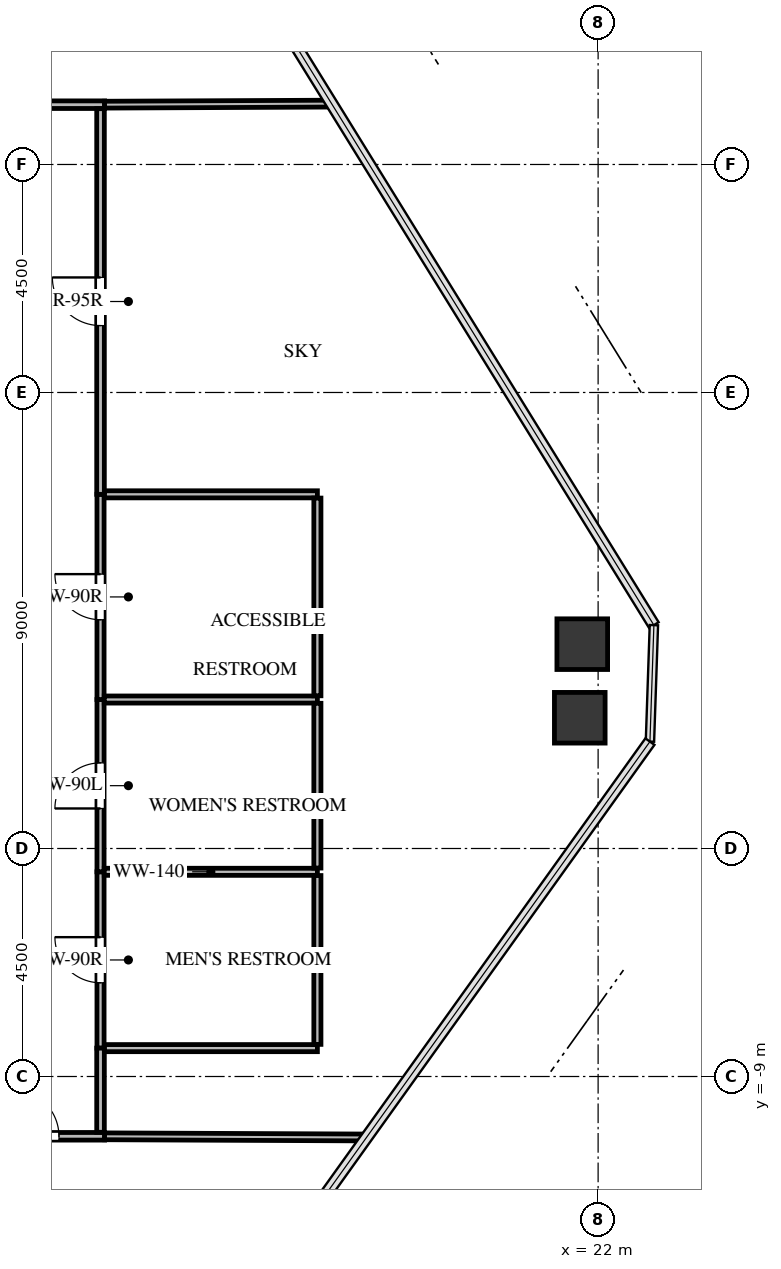
"""IFC4 building model, lengths in metres.
Left out: names, types, materials, properties, quantities, classifications, styles, units other than length and angle.
Written with IfcOpenShell. Run it as: python <this file> out.ifc"""

import sys

from ifc_helpers import new_model, si_unit, direction, frame, frame_2d, origin, origin_2d, place, context, subcontext, project, spatial, rectangle, extrude, source, transform, mapped, element, fill, save


model = new_model("IFC4")
c1 = context("Model", 3, precision=1e-05, world=origin(), true_north=direction((0.0, 1.0)))
c2 = subcontext(c1, "Body", "Model", "MODEL_VIEW")
j1 = project(units=[si_unit("LENGTHUNIT", "METRE"), si_unit("PLANEANGLEUNIT", "RADIAN")], contexts=[c1])
p1 = place(None, origin())
s1 = spatial("IfcSite", under=j1, at=p1, CompositionType="ELEMENT")
p2 = place(p1, origin())
s2 = spatial("IfcBuilding", under=s1, at=p2, CompositionType="ELEMENT")
p3 = place(p2, frame((0.0, 0.0, 155.1)))
s3 = spatial("IfcBuildingStorey", under=s2, at=p3, CompositionType="ELEMENT", Elevation=155.1)
m1 = source(origin(), c2, "Body", "SweptSolid", [
    extrude(rectangle(XDim=1.0, YDim=1.0, at=origin_2d()), origin(), (0.0, 0.0, 1.0), 4.28),
])
for number, where, z_axis, x_axis in (
    (1, (21.687, -0.467, -0.32), (0.0, 0.0, 1.0), (1.0, 0.0, 0.0)),
    (2, (21.638, -1.92, -0.32), (0.0, 0.0, 1.0), (1.0, 0.0, 0.0)),
):
    element("IfcColumn", number, at=place(p3, frame(where, z_axis=z_axis, x_axis=x_axis)), inside=s3, PredefinedType="COLUMN", context=c2, shape_type="MappedRepresentation", body=[
        mapped(m1, transform((0.0, 0.0, 0.0), x_axis=(1.0, 0.0, 0.0), y_axis=(0.0, 1.0, 0.0), z_axis=(0.0, 0.0, 1.0), scale=1.0)),
    ])
p4 = place(p3, frame((12.18, -8.44, 0.0), z_axis=(0.0, 0.0, 1.0), x_axis=(0.0, 1.0, 0.0)))
e3 = element("IfcWall", 3, at=p4, inside=s3, PredefinedType="PARTITIONING", context=c2, shape_type="SweptSolid", body=[
    extrude(rectangle(XDim=3.48, YDim=0.14, at=frame_2d((1.74, 0.0))), origin(), (0.0, 0.0, 1.0), 3.945),
])
p5 = place(p4, frame((1.29, 0.0, 0.0)))
e4 = element("IfcOpeningElement", 4, at=p5, cuts=e3, PredefinedType="OPENING", context=c2, shape_type="SweptSolid", body=[
    extrude(rectangle(XDim=0.9, YDim=2.05, at=frame_2d((0.45, 1.025))), frame((0.0, 0.08, 0.0), z_axis=(0.0, -1.0, 0.0), x_axis=(1.0, 0.0, 0.0)), (0.0, 0.0, 1.0), 0.16),
])
p6 = place(p3, frame((12.18, -4.96, 0.0), z_axis=(0.0, 0.0, 1.0), x_axis=(0.0, 1.0, 0.0)))
e5 = element("IfcWall", 5, at=p6, inside=s3, PredefinedType="PARTITIONING", context=c2, shape_type="SweptSolid", body=[
    extrude(rectangle(XDim=3.4, YDim=0.14, at=frame_2d((1.7, 0.0))), origin(), (0.0, 0.0, 1.0), 3.945),
])
p7 = place(p6, frame((1.25, 0.0, 0.0)))
e6 = element("IfcOpeningElement", 6, at=p7, cuts=e5, PredefinedType="OPENING", context=c2, shape_type="SweptSolid", body=[
    extrude(rectangle(XDim=0.9, YDim=2.05, at=frame_2d((0.45, 1.025))), frame((0.0, 0.08, 0.0), z_axis=(0.0, -1.0, 0.0), x_axis=(1.0, 0.0, 0.0)), (0.0, 0.0, 1.0), 0.16),
])
p8 = place(p3, frame((12.18, -1.56, 0.0), z_axis=(0.0, 0.0, 1.0), x_axis=(0.0, 1.0, 0.0)))
e7 = element("IfcWall", 7, at=p8, inside=s3, PredefinedType="PARTITIONING", context=c2, shape_type="SweptSolid", body=[
    extrude(rectangle(XDim=4.05, YDim=0.14, at=frame_2d((2.025, 0.0))), origin(), (0.0, 0.0, 1.0), 3.142),
])
p9 = place(p8, frame((1.575, 0.0, 0.0)))
e8 = element("IfcOpeningElement", 8, at=p9, cuts=e7, PredefinedType="OPENING", context=c2, shape_type="SweptSolid", body=[
    extrude(rectangle(XDim=0.9, YDim=2.05, at=frame_2d((0.45, 1.025))), frame((0.0, 0.08, 0.0), z_axis=(0.0, -1.0, 0.0), x_axis=(1.0, 0.0, 0.0)), (0.0, 0.0, 1.0), 0.16),
])
p10 = place(p3, frame((12.26, 10.18, 0.0), z_axis=(0.0, 0.0, 1.0), x_axis=(-1.0, 0.0, 0.0)))
e9 = element("IfcWall", 9, at=p10, inside=s3, PredefinedType="PARTITIONING", context=c2, shape_type="SweptSolid", body=[
    extrude(rectangle(XDim=7.72, YDim=0.15, at=frame_2d((3.86, 0.0))), origin(), (0.0, 0.0, 1.0), 3.142),
])
p11 = place(p10, frame((3.4, 0.0, 0.0)))
e10 = element("IfcOpeningElement", 10, at=p11, cuts=e9, PredefinedType="OPENING", context=c2, shape_type="SweptSolid", body=[
    extrude(rectangle(XDim=0.92, YDim=2.1, at=frame_2d((0.46, 1.05))), frame((0.0, 0.085, 0.0), z_axis=(0.0, -1.0, 0.0), x_axis=(1.0, 0.0, 0.0)), (0.0, 0.0, 1.0), 0.17),
])
p12 = place(p3, frame((9.54, -10.18, 0.0), z_axis=(0.0, 0.0, 1.0), x_axis=(1.0, 0.0, 0.0)))
e11 = element("IfcWall", 11, at=p12, inside=s3, PredefinedType="PARTITIONING", context=c2, shape_type="SweptSolid", body=[
    extrude(rectangle(XDim=2.72, YDim=0.15, at=frame_2d((1.36, 0.0))), origin(), (0.0, 0.0, 1.0), 3.945),
])
p13 = place(p12, frame((0.9, 0.0, 0.0)))
e12 = element("IfcOpeningElement", 12, at=p13, cuts=e11, PredefinedType="OPENING", context=c2, shape_type="SweptSolid", body=[
    extrude(rectangle(XDim=0.92, YDim=2.1, at=frame_2d((0.46, 1.05))), frame((0.0, 0.085, 0.0), z_axis=(0.0, -1.0, 0.0), x_axis=(1.0, 0.0, 0.0)), (0.0, 0.0, 1.0), 0.17),
])
p14 = place(p3, frame((12.18, 2.49, 0.0), z_axis=(0.0, 0.0, 1.0), x_axis=(0.0, 1.0, 0.0)))
e13 = element("IfcWall", 13, at=p14, inside=s3, PredefinedType="PARTITIONING", context=c2, shape_type="SweptSolid", body=[
    extrude(rectangle(XDim=7.611, YDim=0.15, at=frame_2d((3.806, 0.0))), origin(), (0.0, 0.0, 1.0), 3.945),
])
p15 = place(p14, frame((3.331, 0.0, 0.0)))
e14 = element("IfcOpeningElement", 14, at=p15, cuts=e13, PredefinedType="OPENING", context=c2, shape_type="SweptSolid", body=[
    extrude(rectangle(XDim=0.95, YDim=2.1, at=frame_2d((0.475, 1.05))), frame((0.0, 0.085, 0.0), z_axis=(0.0, -1.0, 0.0), x_axis=(1.0, 0.0, 0.0)), (0.0, 0.0, 1.0), 0.17),
])
p16 = place(p3, frame((12.18, -10.101, 0.0), z_axis=(0.0, 0.0, 1.0), x_axis=(0.0, 1.0, 0.0)))
e15 = element("IfcWall", 15, at=p16, inside=s3, PredefinedType="PARTITIONING", context=c2, shape_type="SweptSolid", body=[
    extrude(rectangle(XDim=1.661, YDim=0.15, at=frame_2d((0.831, 0.0))), origin(), (0.0, 0.0, 1.0), 3.945),
])
p17 = place(p3, frame((12.254, -4.96, 0.0), z_axis=(0.0, 0.0, 1.0), x_axis=(1.0, 0.0, 0.0)))
e16 = element("IfcWall", 16, at=p17, inside=s3, PredefinedType="PARTITIONING", context=c2, shape_type="SweptSolid", body=[
    extrude(rectangle(XDim=4.206, YDim=0.14, at=frame_2d((2.103, 0.0))), origin(), (0.0, 0.0, 1.0), 3.945),
])
p18 = place(p3, frame((16.46, -8.44, 0.0), z_axis=(0.0, 0.0, 1.0), x_axis=(-1.0, 0.0, 0.0)))
e17 = element("IfcWall", 17, at=p18, inside=s3, PredefinedType="PARTITIONING", context=c2, shape_type="SweptSolid", body=[
    extrude(rectangle(XDim=4.201, YDim=0.14, at=frame_2d((2.101, 0.0))), origin(), (0.0, 0.0, 1.0), 3.945),
])
p19 = place(p3, frame((16.46, -5.034, 0.0), z_axis=(0.0, 0.0, 1.0), x_axis=(0.0, -1.0, 0.0)))
e18 = element("IfcWall", 18, at=p19, inside=s3, PredefinedType="PARTITIONING", context=c2, shape_type="SweptSolid", body=[
    extrude(rectangle(XDim=3.332, YDim=0.14, at=frame_2d((1.666, 0.0))), origin(), (0.0, 0.0, 1.0), 3.945),
])
p20 = place(p3, frame((12.254, -1.56, 0.0), z_axis=(0.0, 0.0, 1.0), x_axis=(1.0, 0.0, 0.0)))
e19 = element("IfcWall", 19, at=p20, inside=s3, PredefinedType="PARTITIONING", context=c2, shape_type="SweptSolid", body=[
    extrude(rectangle(XDim=4.206, YDim=0.14, at=frame_2d((2.103, 0.0))), origin(), (0.0, 0.0, 1.0), 3.945),
])
p21 = place(p3, frame((16.46, -1.634, 0.0), z_axis=(0.0, 0.0, 1.0), x_axis=(0.0, -1.0, 0.0)))
e20 = element("IfcWall", 20, at=p21, inside=s3, PredefinedType="PARTITIONING", context=c2, shape_type="SweptSolid", body=[
    extrude(rectangle(XDim=3.252, YDim=0.14, at=frame_2d((1.626, 0.0))), origin(), (0.0, 0.0, 1.0), 3.945),
])
p22 = place(p3, frame((12.259, 2.49, 0.0), z_axis=(0.0, 0.0, 1.0), x_axis=(1.0, 0.0, 0.0)))
e21 = element("IfcWall", 21, at=p22, inside=s3, PredefinedType="PARTITIONING", context=c2, shape_type="SweptSolid", body=[
    extrude(rectangle(XDim=4.201, YDim=0.14, at=frame_2d((2.101, 0.0))), origin(), (0.0, 0.0, 1.0), 3.945),
])
p23 = place(p3, frame((16.46, 2.416, 0.0), z_axis=(0.0, 0.0, 1.0), x_axis=(0.0, -1.0, 0.0)))
e22 = element("IfcWall", 22, at=p23, inside=s3, PredefinedType="PARTITIONING", context=c2, shape_type="SweptSolid", body=[
    extrude(rectangle(XDim=3.902, YDim=0.14, at=frame_2d((1.951, 0.0))), origin(), (0.0, 0.0, 1.0), 3.142),
])
p24 = place(p3, frame((16.74, 10.201, 0.0), z_axis=(0.0, 0.0, 1.0), x_axis=(-0.999989522694, -0.004577608714, 0.0)))
e23 = element("IfcWall", 23, at=p24, inside=s3, PredefinedType="PARTITIONING", context=c2, shape_type="SweptSolid", body=[
    extrude(rectangle(XDim=4.48, YDim=0.135, at=frame_2d((2.24, 0.0))), origin(), (0.0, 0.0, 1.0), 3.299),
])
p25 = place(p3, frame((12.26, -10.18, 0.0), z_axis=(0.0, 0.0, 1.0), x_axis=(0.999990144117, -0.004439782427, 0.0)))
e24 = element("IfcWall", 24, at=p25, inside=s3, PredefinedType="PARTITIONING", context=c2, shape_type="SweptSolid", body=[
    extrude(rectangle(XDim=5.169, YDim=0.135, at=frame_2d((2.584, 0.0))), origin(), (0.0, 0.0, 1.0), 3.299),
])
m2 = source(origin(), c2, "Body", "SweptSolid", [
    extrude(rectangle(XDim=0.9, YDim=2.05, at=frame_2d((0.45, 1.025))), frame((0.0, 0.025, 0.0), z_axis=(0.0, -1.0, 0.0), x_axis=(1.0, 0.0, 0.0)), (0.0, 0.0, 1.0), 0.05),
])
p26 = place(p5, origin())
e25 = element("IfcDoor", 25, at=p26, inside=s3, OperationType="SINGLE_SWING_RIGHT", PredefinedType="DOOR", context=c2, shape_type="MappedRepresentation", body=[
    mapped(m2, transform((0.0, 0.0, 0.0), x_axis=(1.0, 0.0, 0.0), y_axis=(0.0, 1.0, 0.0), z_axis=(0.0, 0.0, 1.0), scale=1.0)),
])
fill(e4, e25)
m3 = source(origin(), c2, "Body", "SweptSolid", [
    extrude(rectangle(XDim=0.9, YDim=2.05, at=frame_2d((0.45, 1.025))), frame((0.0, 0.025, 0.0), z_axis=(0.0, -1.0, 0.0), x_axis=(1.0, 0.0, 0.0)), (0.0, 0.0, 1.0), 0.05),
])
p27 = place(p7, origin())
e26 = element("IfcDoor", 26, at=p27, inside=s3, OperationType="SINGLE_SWING_LEFT", PredefinedType="DOOR", context=c2, shape_type="MappedRepresentation", body=[
    mapped(m3, transform((0.0, 0.0, 0.0), x_axis=(1.0, 0.0, 0.0), y_axis=(0.0, 1.0, 0.0), z_axis=(0.0, 0.0, 1.0), scale=1.0)),
])
fill(e6, e26)
p28 = place(p9, origin())
e27 = element("IfcDoor", 27, at=p28, inside=s3, OperationType="SINGLE_SWING_RIGHT", PredefinedType="DOOR", context=c2, shape_type="MappedRepresentation", body=[
    mapped(m2, transform((0.0, 0.0, 0.0), x_axis=(1.0, 0.0, 0.0), y_axis=(0.0, 1.0, 0.0), z_axis=(0.0, 0.0, 1.0), scale=1.0)),
])
fill(e8, e27)
m4 = source(origin(), c2, "Body", "SweptSolid", [
    extrude(rectangle(XDim=0.92, YDim=2.1, at=frame_2d((0.46, 1.05))), frame((0.0, 0.025, 0.0), z_axis=(0.0, -1.0, 0.0), x_axis=(1.0, 0.0, 0.0)), (0.0, 0.0, 1.0), 0.05),
])
p29 = place(p13, origin())
e28 = element("IfcDoor", 28, at=p29, inside=s3, OperationType="SINGLE_SWING_LEFT", PredefinedType="DOOR", context=c2, shape_type="MappedRepresentation", body=[
    mapped(m4, transform((0.0, 0.0, 0.0), x_axis=(1.0, 0.0, 0.0), y_axis=(0.0, 1.0, 0.0), z_axis=(0.0, 0.0, 1.0), scale=1.0)),
])
fill(e12, e28)
m5 = source(origin(), c2, "Body", "SweptSolid", [
    extrude(rectangle(XDim=0.95, YDim=2.1, at=frame_2d((0.475, 1.05))), frame((0.0, 0.025, 0.0), z_axis=(0.0, -1.0, 0.0), x_axis=(1.0, 0.0, 0.0)), (0.0, 0.0, 1.0), 0.05),
])
p30 = place(p15, origin())
e29 = element("IfcDoor", 29, at=p30, inside=s3, OperationType="SINGLE_SWING_RIGHT", PredefinedType="DOOR", context=c2, shape_type="MappedRepresentation", body=[
    mapped(m5, transform((0.0, 0.0, 0.0), x_axis=(1.0, 0.0, 0.0), y_axis=(0.0, 1.0, 0.0), z_axis=(0.0, 0.0, 1.0), scale=1.0)),
])
fill(e14, e29)
save(model, sys.argv[1])
